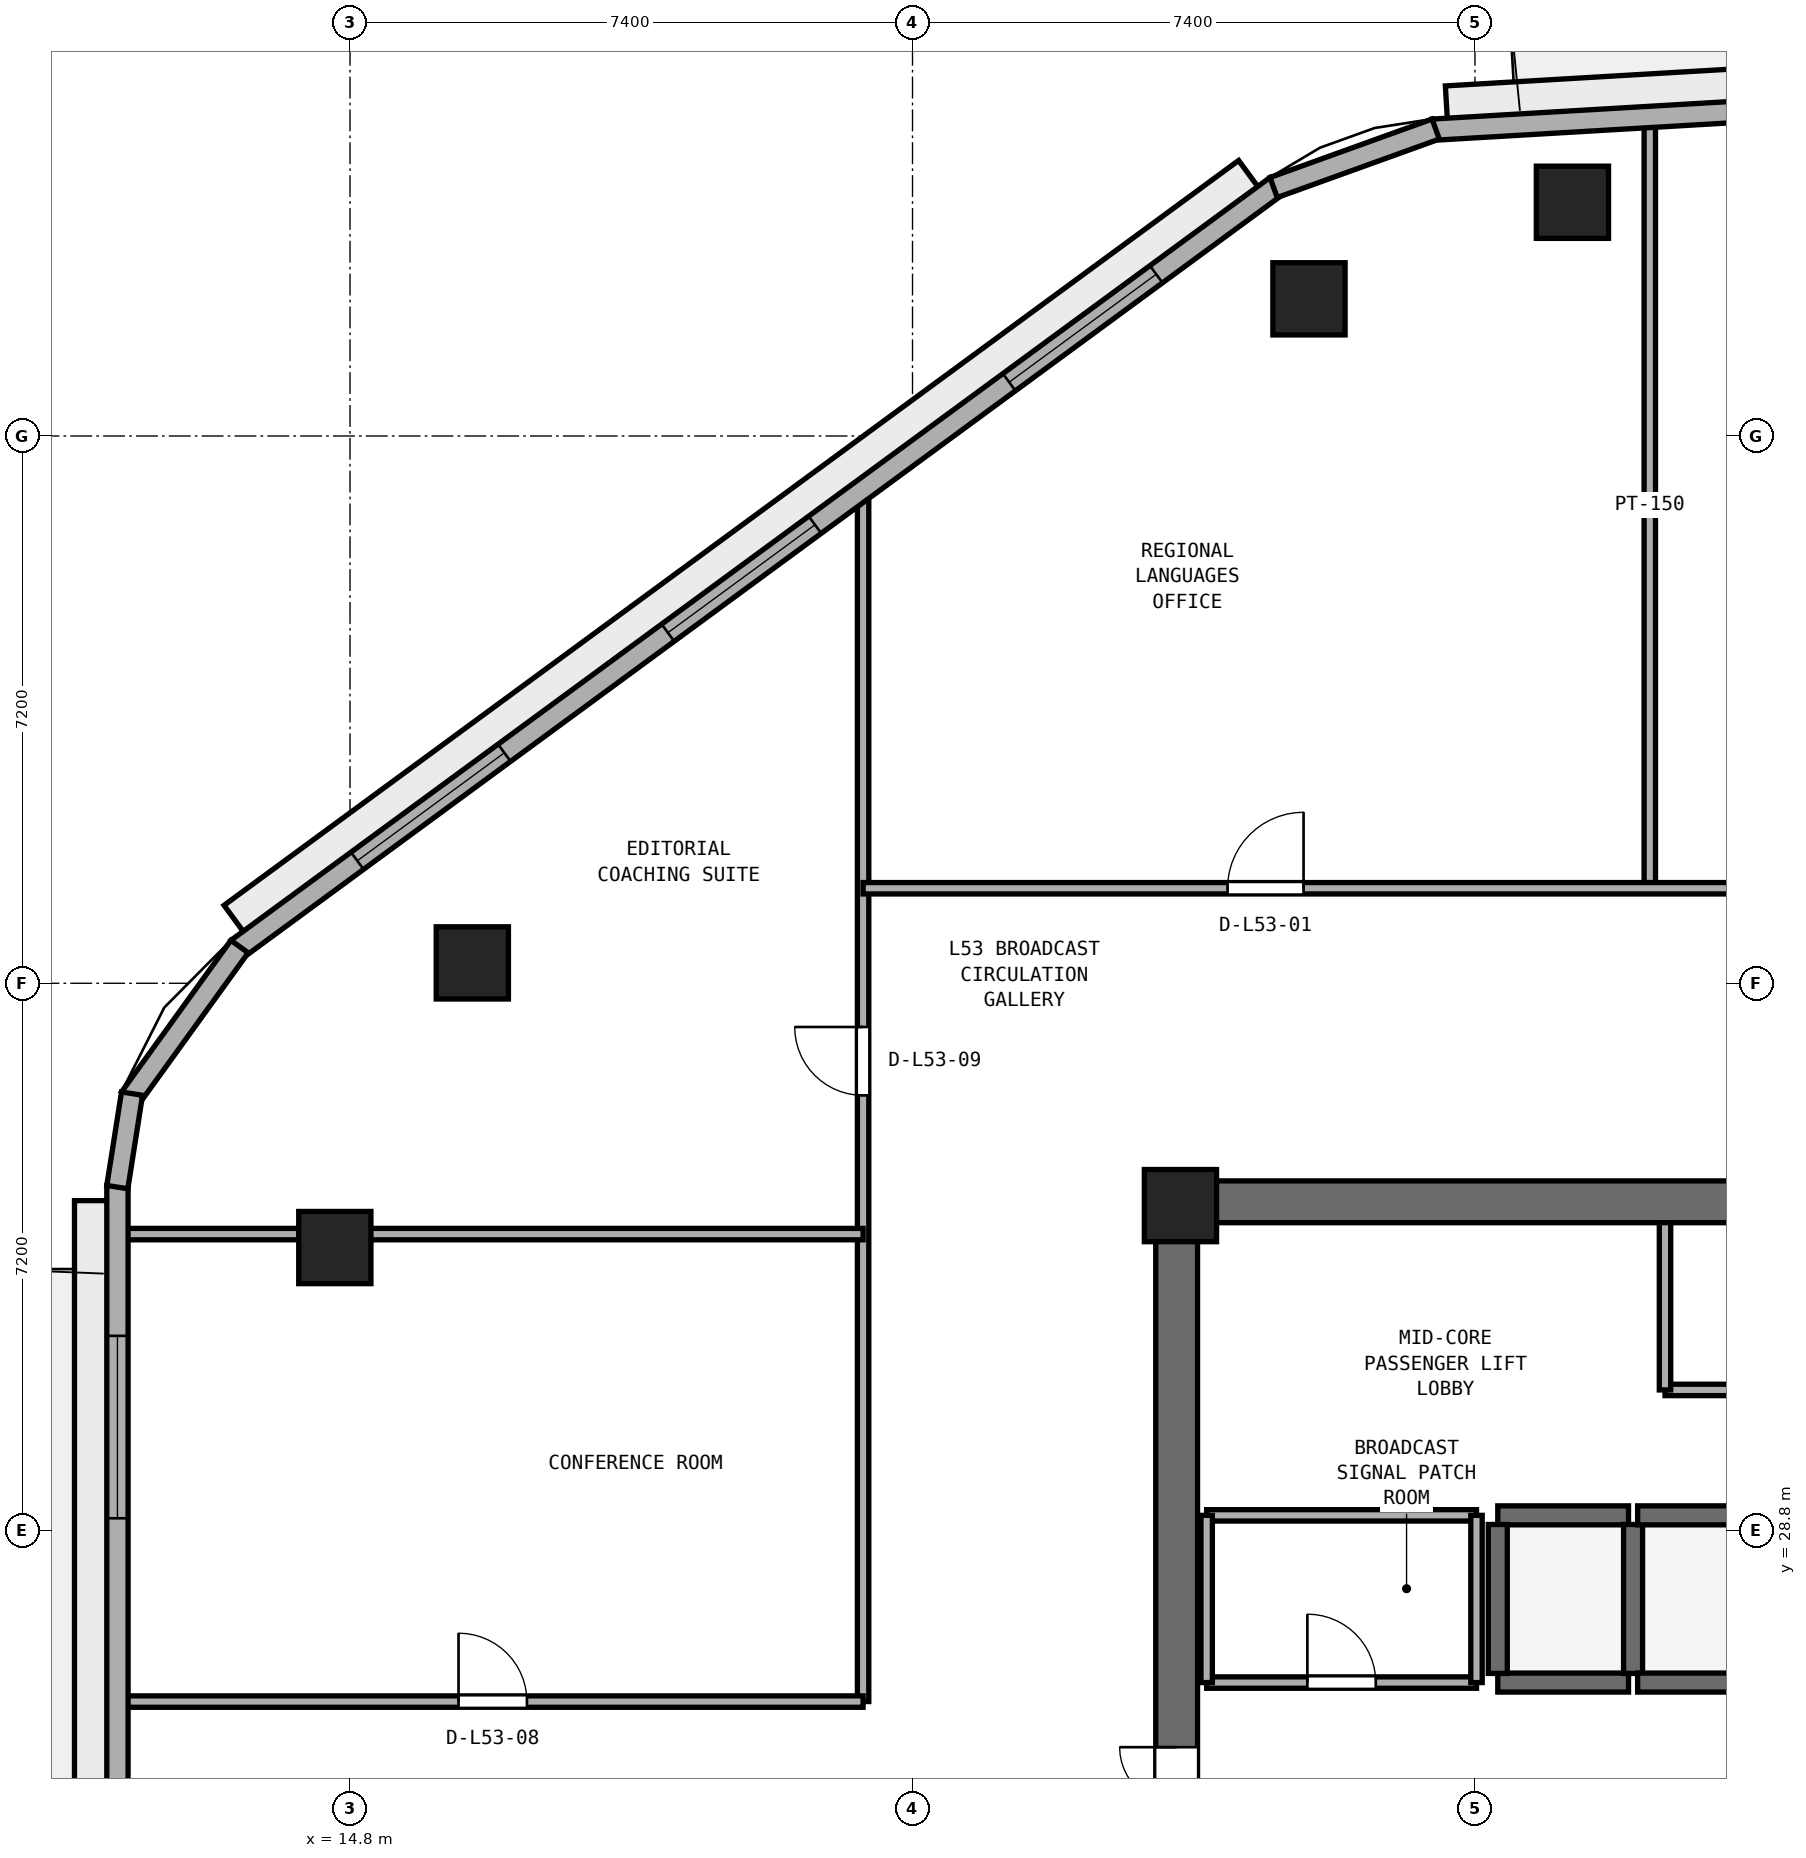
"""IFC4 building model, lengths in metres.
Left out: names, types, materials, properties, quantities, classifications, styles, units other than length and angle.
Written with IfcOpenShell. Run it as: python <this file> out.ifc"""

import sys

from ifc_helpers import new_model, si_unit, direction, frame, frame_2d, origin, origin_2d, place, context, subcontext, project, spatial, rectangle, extrude, element, fill, save


model = new_model("IFC4")
c1 = context("Model", 3, precision=1e-05, world=origin(), true_north=direction((0.0, 1.0)))
c2 = subcontext(c1, "Body", "Model", "MODEL_VIEW")
j1 = project(units=[si_unit("LENGTHUNIT", "METRE"), si_unit("PLANEANGLEUNIT", "RADIAN")], contexts=[c1])
p1 = place(None, origin())
s1 = spatial("IfcSite", under=j1, at=p1, CompositionType="ELEMENT")
p2 = place(p1, origin())
s2 = spatial("IfcBuilding", under=s1, at=p2, CompositionType="ELEMENT")
p3 = place(p2, frame((0.0, 0.0, 208.6)))
s3 = spatial("IfcBuildingStorey", under=s2, at=p3, CompositionType="ELEMENT", Elevation=208.6)
p4 = place(p3, frame((25.4, 33.125, 0.0), z_axis=(0.0, 0.0, 1.0), x_axis=(1.0, 0.0, 0.0)))
e1 = element("IfcWall", 1, at=p4, inside=s3, PredefinedType="SHEAR", context=c2, shape_type="SweptSolid", body=[
    extrude(rectangle(XDim=23.2, YDim=0.55, at=frame_2d((11.6, 0.0))), origin(), (0.0, 0.0, 1.0), 3.54),
])
p5 = place(p3, frame((25.675, 17.55, 0.0), z_axis=(0.0, 0.0, 1.0), x_axis=(0.0, 1.0, 0.0)))
e2 = element("IfcWall", 2, at=p5, inside=s3, PredefinedType="SHEAR", context=c2, shape_type="SweptSolid", body=[
    extrude(rectangle(XDim=15.3, YDim=0.55, at=frame_2d((7.65, 0.0))), origin(), (0.0, 0.0, 1.0), 3.54),
])
p6 = place(p5, frame((6.9, 0.0, 0.0)))
e3 = element("IfcOpeningElement", 3, at=p6, cuts=e2, PredefinedType="OPENING", context=c2, shape_type="SweptSolid", body=[
    extrude(rectangle(XDim=1.5, YDim=2.15, at=frame_2d((0.75, 1.075))), frame((0.0, 0.285, 0.0), z_axis=(0.0, -1.0, 0.0), x_axis=(1.0, 0.0, 0.0)), (0.0, 0.0, 1.0), 0.57),
])
p7 = place(p3, frame((25.725, 33.075, 0.0), z_axis=(0.0, 0.0, 1.0), x_axis=(1.0, 0.0, 0.0)))
e4 = element("IfcColumn", 4, at=p7, inside=s3, PredefinedType="PILASTER", context=c2, shape_type="SweptSolid", body=[
    extrude(rectangle(XDim=0.95, YDim=0.95, at=origin_2d()), origin(), (0.0, 0.0, 1.0), 3.8),
])
for number, where, z_axis, x_axis in (
    (5, (30.882, 46.275, 0.0), (0.0, 0.0, 1.0), (1.0, 0.0, 0.0)),
    (6, (27.416, 45.004, 0.0), (0.0, 0.0, 1.0), (1.0, 0.0, 0.0)),
    (7, (16.409, 36.268, 0.0), (0.0, 0.0, 1.0), (1.0, 0.0, 0.0)),
    (8, (14.6, 32.523, 0.0), (0.0, 0.0, 1.0), (1.0, 0.0, 0.0)),
):
    element("IfcColumn", number, at=place(p3, frame(where, z_axis=z_axis, x_axis=x_axis)), inside=s3, PredefinedType="COLUMN", context=c2, shape_type="SweptSolid", body=[
        extrude(rectangle(XDim=0.95, YDim=0.95, at=origin_2d()), origin(), (0.0, 0.0, 1.0), 3.8),
    ])
for number, where, z_axis, x_axis in (
    (9, (29.9, 26.8, 0.0), (0.0, 0.0, 1.0), (1.0, 0.0, 0.0)),
    (10, (29.9, 29.0, 0.0), (0.0, 0.0, 1.0), (1.0, 0.0, 0.0)),
):
    element("IfcWall", number, at=place(p3, frame(where, z_axis=z_axis, x_axis=x_axis)), inside=s3, PredefinedType="SHEAR", context=c2, shape_type="SweptSolid", body=[
        extrude(rectangle(XDim=1.72, YDim=0.25, at=frame_2d((0.86, 0.0))), origin(), (0.0, 0.0, 1.0), 3.54),
    ])
for number, where, z_axis, x_axis in (
    (11, (29.9, 26.92, 0.0), (0.0, 0.0, 1.0), (0.0, 1.0, 0.0)),
    (12, (31.68, 26.92, 0.0), (0.0, 0.0, 1.0), (0.0, 1.0, 0.0)),
):
    element("IfcWall", number, at=place(p3, frame(where, z_axis=z_axis, x_axis=x_axis)), inside=s3, PredefinedType="SHEAR", context=c2, shape_type="SweptSolid", body=[
        extrude(rectangle(XDim=1.96, YDim=0.25, at=frame_2d((0.98, 0.0))), origin(), (0.0, 0.0, 1.0), 3.54),
    ])
for number, where, z_axis, x_axis in (
    (13, (31.74, 26.8, 0.0), (0.0, 0.0, 1.0), (1.0, 0.0, 0.0)),
    (14, (31.74, 29.0, 0.0), (0.0, 0.0, 1.0), (1.0, 0.0, 0.0)),
):
    element("IfcWall", number, at=place(p3, frame(where, z_axis=z_axis, x_axis=x_axis)), inside=s3, PredefinedType="SHEAR", context=c2, shape_type="SweptSolid", body=[
        extrude(rectangle(XDim=1.72, YDim=0.25, at=frame_2d((0.86, 0.0))), origin(), (0.0, 0.0, 1.0), 3.54),
    ])
p8 = place(p3, frame((32.1, 30.65, 0.0), z_axis=(0.0, 0.0, 1.0), x_axis=(1.0, 0.0, 0.0)))
e15 = element("IfcWall", 15, at=p8, inside=s3, PredefinedType="PARTITIONING", context=c2, shape_type="SweptSolid", body=[
    extrude(rectangle(XDim=4.75, YDim=0.15, at=frame_2d((2.375, 0.0))), origin(), (0.0, 0.0, 1.0), 3.54),
])
p9 = place(p8, frame((1.9, 0.0, 0.0)))
e16 = element("IfcOpeningElement", 16, at=p9, cuts=e15, PredefinedType="OPENING", context=c2, shape_type="SweptSolid", body=[
    extrude(rectangle(XDim=0.95, YDim=2.1, at=frame_2d((0.475, 1.05))), frame((0.0, 0.085, 0.0), z_axis=(0.0, -1.0, 0.0), x_axis=(1.0, 0.0, 0.0)), (0.0, 0.0, 1.0), 0.17),
])
p10 = place(p3, frame((32.1, 30.65, 0.0), z_axis=(0.0, 0.0, 1.0), x_axis=(0.0, 1.0, 0.0)))
e17 = element("IfcWall", 17, at=p10, inside=s3, PredefinedType="PARTITIONING", context=c2, shape_type="SweptSolid", body=[
    extrude(rectangle(XDim=2.2, YDim=0.15, at=frame_2d((1.1, 0.0))), origin(), (0.0, 0.0, 1.0), 3.54),
])
p11 = place(p3, frame((26.07, 26.8, 0.0), z_axis=(0.0, 0.0, 1.0), x_axis=(1.0, 0.0, 0.0)))
e18 = element("IfcWall", 18, at=p11, inside=s3, PredefinedType="PARTITIONING", context=c2, shape_type="SweptSolid", body=[
    extrude(rectangle(XDim=3.55, YDim=0.15, at=frame_2d((1.775, 0.0))), origin(), (0.0, 0.0, 1.0), 3.54),
])
p12 = place(p11, frame((1.325, 0.0, 0.0)))
e19 = element("IfcOpeningElement", 19, at=p12, cuts=e18, PredefinedType="OPENING", context=c2, shape_type="SweptSolid", body=[
    extrude(rectangle(XDim=0.9, YDim=2.1, at=frame_2d((0.45, 1.05))), frame((0.0, 0.085, 0.0), z_axis=(0.0, -1.0, 0.0), x_axis=(1.0, 0.0, 0.0)), (0.0, 0.0, 1.0), 0.17),
])
p13 = place(p3, frame((26.07, 29.0, 0.0), z_axis=(0.0, 0.0, 1.0), x_axis=(1.0, 0.0, 0.0)))
e20 = element("IfcWall", 20, at=p13, inside=s3, PredefinedType="PARTITIONING", context=c2, shape_type="SweptSolid", body=[
    extrude(rectangle(XDim=3.55, YDim=0.15, at=frame_2d((1.775, 0.0))), origin(), (0.0, 0.0, 1.0), 3.54),
])
p14 = place(p3, frame((26.07, 26.8, 0.0), z_axis=(0.0, 0.0, 1.0), x_axis=(0.0, 1.0, 0.0)))
e21 = element("IfcWall", 21, at=p14, inside=s3, PredefinedType="PARTITIONING", context=c2, shape_type="SweptSolid", body=[
    extrude(rectangle(XDim=2.2, YDim=0.15, at=frame_2d((1.1, 0.0))), origin(), (0.0, 0.0, 1.0), 2.64),
])
p15 = place(p3, frame((29.62, 26.8, 0.0), z_axis=(0.0, 0.0, 1.0), x_axis=(0.0, 1.0, 0.0)))
e22 = element("IfcWall", 22, at=p15, inside=s3, PredefinedType="PARTITIONING", context=c2, shape_type="SweptSolid", body=[
    extrude(rectangle(XDim=2.2, YDim=0.15, at=frame_2d((1.1, 0.0))), origin(), (0.0, 0.0, 1.0), 3.54),
])
p16 = place(p3, frame((31.9, 37.25, 0.0), z_axis=(0.0, 0.0, 1.0), x_axis=(0.0, 1.0, 0.0)))
e23 = element("IfcWall", 23, at=p16, inside=s3, PredefinedType="PARTITIONING", context=c2, shape_type="SweptSolid", body=[
    extrude(rectangle(XDim=10.083, YDim=0.15, at=frame_2d((5.042, 0.0))), origin(), (0.0, 0.0, 1.0), 3.54),
])
p17 = place(p3, frame((21.55, 26.55, 0.0), z_axis=(0.0, 0.0, 1.0), x_axis=(0.0, 1.0, 0.0)))
e24 = element("IfcWall", 24, at=p17, inside=s3, PredefinedType="PARTITIONING", context=c2, shape_type="SweptSolid", body=[
    extrude(rectangle(XDim=15.98, YDim=0.15, at=frame_2d((7.99, 0.0))), origin(), (0.0, 0.0, 1.0), 3.54),
])
p18 = place(p17, frame((7.975, 0.0, 0.0)))
e25 = element("IfcOpeningElement", 25, at=p18, cuts=e24, PredefinedType="OPENING", context=c2, shape_type="SweptSolid", body=[
    extrude(rectangle(XDim=0.9, YDim=2.1, at=frame_2d((0.45, 1.05))), frame((0.0, 0.085, 0.0), z_axis=(0.0, -1.0, 0.0), x_axis=(1.0, 0.0, 0.0)), (0.0, 0.0, 1.0), 0.17),
])
p19 = place(p3, frame((11.805, 26.55, 0.0), z_axis=(0.0, 0.0, 1.0), x_axis=(1.0, 0.0, 0.0)))
e26 = element("IfcWall", 26, at=p19, inside=s3, PredefinedType="PARTITIONING", context=c2, shape_type="SweptSolid", body=[
    extrude(rectangle(XDim=9.745, YDim=0.15, at=frame_2d((4.873, 0.0))), origin(), (0.0, 0.0, 1.0), 3.54),
])
p20 = place(p19, frame((4.423, 0.0, 0.0)))
e27 = element("IfcOpeningElement", 27, at=p20, cuts=e26, PredefinedType="OPENING", context=c2, shape_type="SweptSolid", body=[
    extrude(rectangle(XDim=0.9, YDim=2.1, at=frame_2d((0.45, 1.05))), frame((0.0, 0.085, 0.0), z_axis=(0.0, -1.0, 0.0), x_axis=(1.0, 0.0, 0.0)), (0.0, 0.0, 1.0), 0.17),
])
p21 = place(p3, frame((11.805, 32.7, 0.0), z_axis=(0.0, 0.0, 1.0), x_axis=(1.0, 0.0, 0.0)))
e28 = element("IfcWall", 28, at=p21, inside=s3, PredefinedType="PARTITIONING", context=c2, shape_type="SweptSolid", body=[
    extrude(rectangle(XDim=9.745, YDim=0.15, at=frame_2d((4.873, 0.0))), origin(), (0.0, 0.0, 1.0), 2.923),
])
p22 = place(p3, frame((21.55, 37.25, 0.0), z_axis=(0.0, 0.0, 1.0), x_axis=(1.0, 0.0, 0.0)))
e29 = element("IfcWall", 29, at=p22, inside=s3, PredefinedType="PARTITIONING", context=c2, shape_type="SweptSolid", body=[
    extrude(rectangle(XDim=12.85, YDim=0.15, at=frame_2d((6.425, 0.0))), origin(), (0.0, 0.0, 1.0), 3.54),
])
p23 = place(p22, frame((4.795, 0.0, 0.0)))
e30 = element("IfcOpeningElement", 30, at=p23, cuts=e29, PredefinedType="OPENING", context=c2, shape_type="SweptSolid", body=[
    extrude(rectangle(XDim=1.0, YDim=2.12, at=frame_2d((0.5, 1.06))), frame((0.0, 0.085, 0.0), z_axis=(0.0, -1.0, 0.0), x_axis=(1.0, 0.0, 0.0)), (0.0, 0.0, 1.0), 0.17),
])
p24 = place(p3, frame((46.846, 48.277, 0.0), z_axis=(0.0, 0.0, 1.0), x_axis=(-0.998273806631, -0.05873165241, 0.0)))
e31 = element("IfcWall", 31, at=p24, inside=s3, PredefinedType="STANDARD", context=c2, shape_type="SweptSolid", body=[
    extrude(rectangle(XDim=17.833, YDim=0.28, at=frame_2d((8.917, 0.0))), origin(), (0.0, 0.0, 1.0), 3.54),
])
p25 = place(p24, frame((8.366, 0.0, 0.0)))
e32 = element("IfcOpeningElement", 32, at=p25, cuts=e31, PredefinedType="OPENING", context=c2, shape_type="SweptSolid", body=[
    extrude(rectangle(XDim=1.1, YDim=2.2, at=frame_2d((0.55, 1.1))), frame((0.0, 0.15, 0.0), z_axis=(0.0, -1.0, 0.0), x_axis=(1.0, 0.0, 0.0)), (0.0, 0.0, 1.0), 0.3),
])
p26 = place(p24, frame((2.105, 0.0, 0.9)))
e33 = element("IfcOpeningElement", 33, at=p26, cuts=e31, PredefinedType="OPENING", context=c2, shape_type="SweptSolid", body=[
    extrude(rectangle(XDim=2.4, YDim=1.75, at=frame_2d((1.2, 0.875))), frame((0.0, 0.15, 0.0), z_axis=(0.0, -1.0, 0.0), x_axis=(1.0, 0.0, 0.0)), (0.0, 0.0, 1.0), 0.3),
])
p27 = place(p3, frame((26.986, 46.488, 0.0), z_axis=(0.0, 0.0, 1.0), x_axis=(-0.806097783211, -0.59178236194, 0.0)))
e34 = element("IfcWall", 34, at=p27, inside=s3, PredefinedType="STANDARD", context=c2, shape_type="SweptSolid", body=[
    extrude(rectangle(XDim=16.959, YDim=0.28, at=frame_2d((8.479, 0.0))), origin(), (0.0, 0.0, 1.0), 3.54),
])
p28 = place(p27, frame((1.96, 0.0, 0.9)))
e35 = element("IfcOpeningElement", 35, at=p28, cuts=e34, PredefinedType="OPENING", context=c2, shape_type="SweptSolid", body=[
    extrude(rectangle(XDim=2.4, YDim=1.75, at=frame_2d((1.2, 0.875))), frame((0.0, 0.15, 0.0), z_axis=(0.0, -1.0, 0.0), x_axis=(1.0, 0.0, 0.0)), (0.0, 0.0, 1.0), 0.3),
])
p29 = place(p27, frame((7.529, 0.0, 0.9)))
e36 = element("IfcOpeningElement", 36, at=p29, cuts=e34, PredefinedType="OPENING", context=c2, shape_type="SweptSolid", body=[
    extrude(rectangle(XDim=2.4, YDim=1.75, at=frame_2d((1.2, 0.875))), frame((0.0, 0.15, 0.0), z_axis=(0.0, -1.0, 0.0), x_axis=(1.0, 0.0, 0.0)), (0.0, 0.0, 1.0), 0.3),
])
p30 = place(p27, frame((12.599, 0.0, 0.9)))
e37 = element("IfcOpeningElement", 37, at=p30, cuts=e34, PredefinedType="OPENING", context=c2, shape_type="SweptSolid", body=[
    extrude(rectangle(XDim=2.4, YDim=1.75, at=frame_2d((1.2, 0.875))), frame((0.0, 0.15, 0.0), z_axis=(0.0, -1.0, 0.0), x_axis=(1.0, 0.0, 0.0)), (0.0, 0.0, 1.0), 0.3),
])
p31 = place(p3, frame((11.74, 33.34, 0.0), z_axis=(0.0, 0.0, 1.0), x_axis=(0.0, -1.0, 0.0)))
e38 = element("IfcWall", 38, at=p31, inside=s3, PredefinedType="STANDARD", context=c2, shape_type="SweptSolid", body=[
    extrude(rectangle(XDim=17.073, YDim=0.28, at=frame_2d((8.536, 0.0))), origin(), (0.0, 0.0, 1.0), 3.54),
])
p32 = place(p31, frame((7.986, 0.0, 0.0)))
e39 = element("IfcOpeningElement", 39, at=p32, cuts=e38, PredefinedType="OPENING", context=c2, shape_type="SweptSolid", body=[
    extrude(rectangle(XDim=1.1, YDim=2.2, at=frame_2d((0.55, 1.1))), frame((0.0, 0.15, 0.0), z_axis=(0.0, -1.0, 0.0), x_axis=(1.0, 0.0, 0.0)), (0.0, 0.0, 1.0), 0.3),
])
p33 = place(p31, frame((1.979, 0.0, 0.9)))
e40 = element("IfcOpeningElement", 40, at=p33, cuts=e38, PredefinedType="OPENING", context=c2, shape_type="SweptSolid", body=[
    extrude(rectangle(XDim=2.4, YDim=1.75, at=frame_2d((1.2, 0.875))), frame((0.0, 0.15, 0.0), z_axis=(0.0, -1.0, 0.0), x_axis=(1.0, 0.0, 0.0)), (0.0, 0.0, 1.0), 0.3),
])
p34 = place(p3, frame((29.083, 47.238, 0.0), z_axis=(0.0, 0.0, 1.0), x_axis=(-0.940723909279, -0.33917329864, 0.0)))
e41 = element("IfcWall", 41, at=p34, inside=s3, PredefinedType="STANDARD", context=c2, shape_type="SweptSolid", body=[
    extrude(rectangle(XDim=2.267, YDim=0.28, at=frame_2d((1.133, 0.0))), origin(), (0.0, 0.0, 1.0), 3.54),
])
p35 = place(p3, frame((13.346, 36.483, 0.0), z_axis=(0.0, 0.0, 1.0), x_axis=(-0.585128091556, -0.810940883463, 0.0)))
e42 = element("IfcWall", 42, at=p35, inside=s3, PredefinedType="STANDARD", context=c2, shape_type="SweptSolid", body=[
    extrude(rectangle(XDim=2.46, YDim=0.28, at=frame_2d((1.23, 0.0))), origin(), (0.0, 0.0, 1.0), 3.54),
])
p36 = place(p3, frame((11.932, 34.548, 0.0), z_axis=(0.0, 0.0, 1.0), x_axis=(-0.155519443181, -0.987832831401, 0.0)))
e43 = element("IfcWall", 43, at=p36, inside=s3, PredefinedType="STANDARD", context=c2, shape_type="SweptSolid", body=[
    extrude(rectangle(XDim=1.245, YDim=0.28, at=frame_2d((0.623, 0.0))), origin(), (0.0, 0.0, 1.0), 3.54),
])
p37 = place(p6, origin())
e44 = element("IfcDoor", 44, at=p37, inside=s3, OperationType="DOUBLE_DOOR_SINGLE_SWING", PredefinedType="DOOR", context=c2, shape_type="SweptSolid", body=[
    extrude(rectangle(XDim=1.5, YDim=2.15, at=frame_2d((0.75, 1.075))), frame((0.0, 0.025, 0.0), z_axis=(0.0, -1.0, 0.0), x_axis=(1.0, 0.0, 0.0)), (0.0, 0.0, 1.0), 0.05),
])
fill(e3, e44)
p38 = place(p12, origin())
e45 = element("IfcDoor", 45, at=p38, inside=s3, OperationType="SINGLE_SWING_LEFT", PredefinedType="DOOR", context=c2, shape_type="SweptSolid", body=[
    extrude(rectangle(XDim=0.9, YDim=2.1, at=frame_2d((0.45, 1.05))), frame((0.0, 0.025, 0.0), z_axis=(0.0, -1.0, 0.0), x_axis=(1.0, 0.0, 0.0)), (0.0, 0.0, 1.0), 0.05),
])
fill(e19, e45)
p39 = place(p23, origin())
e46 = element("IfcDoor", 46, at=p39, inside=s3, OperationType="SINGLE_SWING_RIGHT", PredefinedType="DOOR", context=c2, shape_type="SweptSolid", body=[
    extrude(rectangle(XDim=1.0, YDim=2.12, at=frame_2d((0.5, 1.06))), frame((0.0, 0.025, 0.0), z_axis=(0.0, -1.0, 0.0), x_axis=(1.0, 0.0, 0.0)), (0.0, 0.0, 1.0), 0.05),
])
fill(e30, e46)
p40 = place(p20, origin())
e47 = element("IfcDoor", 47, at=p40, inside=s3, OperationType="SINGLE_SWING_LEFT", PredefinedType="DOOR", context=c2, shape_type="SweptSolid", body=[
    extrude(rectangle(XDim=0.9, YDim=2.1, at=frame_2d((0.45, 1.05))), frame((0.0, 0.025, 0.0), z_axis=(0.0, -1.0, 0.0), x_axis=(1.0, 0.0, 0.0)), (0.0, 0.0, 1.0), 0.05),
])
fill(e27, e47)
p41 = place(p18, origin())
e48 = element("IfcDoor", 48, at=p41, inside=s3, OperationType="SINGLE_SWING_RIGHT", PredefinedType="DOOR", context=c2, shape_type="SweptSolid", body=[
    extrude(rectangle(XDim=0.9, YDim=2.1, at=frame_2d((0.45, 1.05))), frame((0.0, 0.025, 0.0), z_axis=(0.0, -1.0, 0.0), x_axis=(1.0, 0.0, 0.0)), (0.0, 0.0, 1.0), 0.05),
])
fill(e25, e48)
p42 = place(p28, origin())
e49 = element("IfcWindow", 49, at=p42, inside=s3, PartitioningType="SINGLE_PANEL", PredefinedType="WINDOW", context=c2, shape_type="SweptSolid", body=[
    extrude(rectangle(XDim=2.4, YDim=1.75, at=frame_2d((1.2, 0.875))), frame((0.0, 0.03, 0.0), z_axis=(0.0, -1.0, 0.0), x_axis=(1.0, 0.0, 0.0)), (0.0, 0.0, 1.0), 0.06),
])
fill(e35, e49)
p43 = place(p29, origin())
e50 = element("IfcWindow", 50, at=p43, inside=s3, PartitioningType="SINGLE_PANEL", PredefinedType="WINDOW", context=c2, shape_type="SweptSolid", body=[
    extrude(rectangle(XDim=2.4, YDim=1.75, at=frame_2d((1.2, 0.875))), frame((0.0, 0.03, 0.0), z_axis=(0.0, -1.0, 0.0), x_axis=(1.0, 0.0, 0.0)), (0.0, 0.0, 1.0), 0.06),
])
fill(e36, e50)
p44 = place(p30, origin())
e51 = element("IfcWindow", 51, at=p44, inside=s3, PartitioningType="SINGLE_PANEL", PredefinedType="WINDOW", context=c2, shape_type="SweptSolid", body=[
    extrude(rectangle(XDim=2.4, YDim=1.75, at=frame_2d((1.2, 0.875))), frame((0.0, 0.03, 0.0), z_axis=(0.0, -1.0, 0.0), x_axis=(1.0, 0.0, 0.0)), (0.0, 0.0, 1.0), 0.06),
])
fill(e37, e51)
p45 = place(p33, origin())
e52 = element("IfcWindow", 52, at=p45, inside=s3, PartitioningType="SINGLE_PANEL", PredefinedType="WINDOW", context=c2, shape_type="SweptSolid", body=[
    extrude(rectangle(XDim=2.4, YDim=1.75, at=frame_2d((1.2, 0.875))), frame((0.0, 0.03, 0.0), z_axis=(0.0, -1.0, 0.0), x_axis=(1.0, 0.0, 0.0)), (0.0, 0.0, 1.0), 0.06),
])
fill(e40, e52)
save(model, sys.argv[1])
